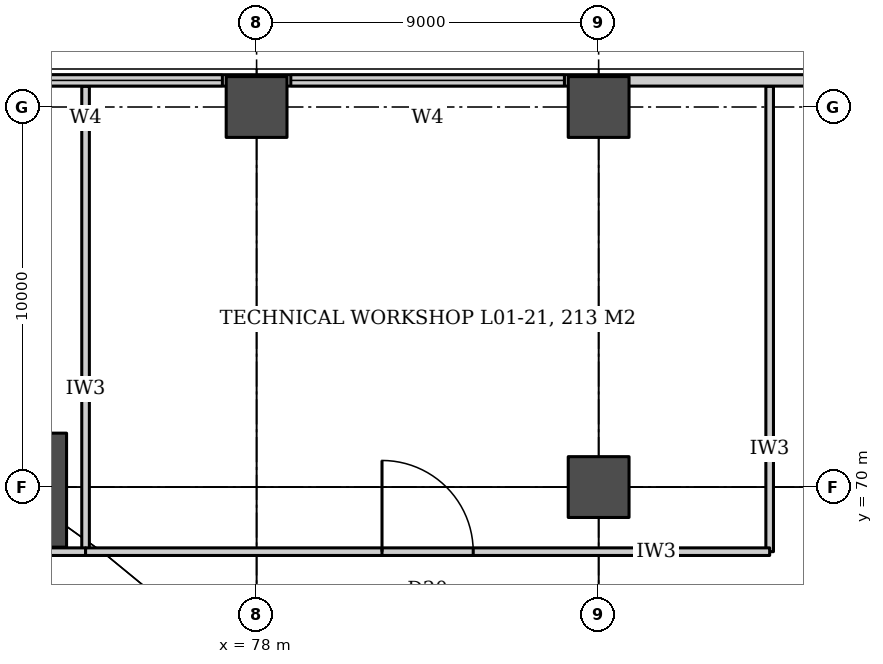
"""IFC4 building model, lengths in metres.
Left out: names, types, materials, properties, quantities, classifications, styles, units other than length and angle.
Written with IfcOpenShell. Run it as: python <this file> out.ifc"""

import sys

from ifc_helpers import new_model, si_unit, direction, frame, frame_2d, origin, origin_2d, place, context, subcontext, project, spatial, rectangle, circle, extrude, element, fill, save


model = new_model("IFC4")
c1 = context("Model", 3, precision=1e-05, world=origin(), true_north=direction((0.0, 1.0)))
c2 = subcontext(c1, "Body", "Model", "MODEL_VIEW")
j1 = project(units=[si_unit("LENGTHUNIT", "METRE"), si_unit("PLANEANGLEUNIT", "RADIAN")], contexts=[c1])
p1 = place(None, origin())
s1 = spatial("IfcSite", under=j1, at=p1, CompositionType="ELEMENT")
p2 = place(p1, origin())
s2 = spatial("IfcBuilding", under=s1, at=p2, CompositionType="ELEMENT")
p3 = place(p2, frame((0.0, 0.0, 6.0)))
s3 = spatial("IfcBuildingStorey", under=s2, at=p3, CompositionType="ELEMENT", Elevation=6.0)
for number, where, z_axis, x_axis in (
    (1, (87.0, 70.0, 0.0), (0.0, 0.0, 1.0), (1.0, 0.0, 0.0)),
    (2, (78.0, 80.0, 0.0), (0.0, 0.0, 1.0), (1.0, 0.0, 0.0)),
    (3, (87.0, 80.0, 0.0), (0.0, 0.0, 1.0), (1.0, 0.0, 0.0)),
):
    element("IfcColumn", number, at=place(p3, frame(where, z_axis=z_axis, x_axis=x_axis)), inside=s3, PredefinedType="COLUMN", context=c2, shape_type="SweptSolid", body=[
        extrude(rectangle(XDim=1.6, YDim=1.6, at=origin_2d()), origin(), (0.0, 0.0, 1.0), 9.0),
    ])
p4 = place(p3, frame((71.5, 69.919, 0.0), z_axis=(0.0, 0.0, 1.0), x_axis=(1.0, 0.0, 0.0)))
e4 = element("IfcColumn", 4, at=p4, inside=s3, PredefinedType="COLUMN", context=c2, shape_type="SweptSolid", body=[
    extrude(circle(Radius=1.5, at=origin_2d()), origin(), (0.0, 0.0, 1.0), 9.0),
])
for number, where, z_axis, x_axis in (
    (5, (73.5, 68.3, 0.0), (0.0, 0.0, 1.0), (0.0, 1.0, 0.0)),
    (6, (91.5, 68.3, 0.0), (0.0, 0.0, 1.0), (0.0, 1.0, 0.0)),
):
    element("IfcWall", number, at=place(p3, frame(where, z_axis=z_axis, x_axis=x_axis)), inside=s3, PredefinedType="PARTITIONING", context=c2, shape_type="SweptSolid", body=[
        extrude(rectangle(XDim=12.245, YDim=0.2, at=frame_2d((6.123, 0.0))), origin(), (0.0, 0.0, 1.0), 6.68),
    ])
p5 = place(p3, frame((46.5, 68.3, 0.0), z_axis=(0.0, 0.0, 1.0), x_axis=(1.0, 0.0, 0.0)))
e7 = element("IfcWall", 7, at=p5, inside=s3, PredefinedType="PARTITIONING", context=c2, shape_type="SweptSolid", body=[
    extrude(rectangle(XDim=27.0, YDim=0.2, at=frame_2d((13.5, 0.0))), origin(), (0.0, 0.0, 1.0), 6.08),
])
p6 = place(p5, frame((13.0, 0.0, 0.0)))
e8 = element("IfcOpeningElement", 8, at=p6, cuts=e7, PredefinedType="OPENING", context=c2, shape_type="SweptSolid", body=[
    extrude(rectangle(XDim=1.0, YDim=2.1, at=frame_2d((0.5, 1.05))), frame((0.0, 0.11, 0.0), z_axis=(0.0, -1.0, 0.0), x_axis=(1.0, 0.0, 0.0)), (0.0, 0.0, 1.0), 0.22),
])
p7 = place(p3, frame((73.5, 68.3, 0.0), z_axis=(0.0, 0.0, 1.0), x_axis=(1.0, 0.0, 0.0)))
e9 = element("IfcWall", 9, at=p7, inside=s3, PredefinedType="PARTITIONING", context=c2, shape_type="SweptSolid", body=[
    extrude(rectangle(XDim=18.0, YDim=0.2, at=frame_2d((9.0, 0.0))), origin(), (0.0, 0.0, 1.0), 6.68),
])
p8 = place(p7, frame((7.8, 0.0, 0.0)))
e10 = element("IfcOpeningElement", 10, at=p8, cuts=e9, PredefinedType="OPENING", context=c2, shape_type="SweptSolid", body=[
    extrude(rectangle(XDim=2.4, YDim=2.7, at=frame_2d((1.2, 1.35))), frame((0.0, 0.11, 0.0), z_axis=(0.0, -1.0, 0.0), x_axis=(1.0, 0.0, 0.0)), (0.0, 0.0, 1.0), 0.22),
])
p9 = place(p3, frame((95.0, 80.7, 0.0), z_axis=(0.0, 0.0, 1.0), x_axis=(-1.0, 0.0, 0.0)))
e11 = element("IfcWall", 11, at=p9, inside=s3, PredefinedType="SOLIDWALL", context=c2, shape_type="SweptSolid", body=[
    extrude(rectangle(XDim=70.0, YDim=0.3, at=frame_2d((35.0, 0.0))), origin(), (0.0, 0.0, 1.0), 8.7),
])
p10 = place(p9, frame((53.9, 0.0, 6.6)))
e12 = element("IfcOpeningElement", 12, at=p10, cuts=e11, PredefinedType="OPENING", context=c2, shape_type="SweptSolid", body=[
    extrude(rectangle(XDim=7.2, YDim=1.2, at=frame_2d((3.6, 0.6))), frame((0.0, 0.16, 0.0), z_axis=(0.0, -1.0, 0.0), x_axis=(1.0, 0.0, 0.0)), (0.0, 0.0, 1.0), 0.32),
])
p11 = place(p9, frame((44.9, 0.0, 6.6)))
e13 = element("IfcOpeningElement", 13, at=p11, cuts=e11, PredefinedType="OPENING", context=c2, shape_type="SweptSolid", body=[
    extrude(rectangle(XDim=7.2, YDim=1.2, at=frame_2d((3.6, 0.6))), frame((0.0, 0.16, 0.0), z_axis=(0.0, -1.0, 0.0), x_axis=(1.0, 0.0, 0.0)), (0.0, 0.0, 1.0), 0.32),
])
p12 = place(p9, frame((35.9, 0.0, 6.6)))
e14 = element("IfcOpeningElement", 14, at=p12, cuts=e11, PredefinedType="OPENING", context=c2, shape_type="SweptSolid", body=[
    extrude(rectangle(XDim=7.2, YDim=1.2, at=frame_2d((3.6, 0.6))), frame((0.0, 0.16, 0.0), z_axis=(0.0, -1.0, 0.0), x_axis=(1.0, 0.0, 0.0)), (0.0, 0.0, 1.0), 0.32),
])
p13 = place(p9, frame((26.9, 0.0, 6.6)))
e15 = element("IfcOpeningElement", 15, at=p13, cuts=e11, PredefinedType="OPENING", context=c2, shape_type="SweptSolid", body=[
    extrude(rectangle(XDim=7.2, YDim=1.2, at=frame_2d((3.6, 0.6))), frame((0.0, 0.16, 0.0), z_axis=(0.0, -1.0, 0.0), x_axis=(1.0, 0.0, 0.0)), (0.0, 0.0, 1.0), 0.32),
])
p14 = place(p9, frame((17.9, 0.0, 6.6)))
e16 = element("IfcOpeningElement", 16, at=p14, cuts=e11, PredefinedType="OPENING", context=c2, shape_type="SweptSolid", body=[
    extrude(rectangle(XDim=7.2, YDim=1.2, at=frame_2d((3.6, 0.6))), frame((0.0, 0.16, 0.0), z_axis=(0.0, -1.0, 0.0), x_axis=(1.0, 0.0, 0.0)), (0.0, 0.0, 1.0), 0.32),
])
p15 = place(p9, frame((8.9, 0.0, 6.6)))
e17 = element("IfcOpeningElement", 17, at=p15, cuts=e11, PredefinedType="OPENING", context=c2, shape_type="SweptSolid", body=[
    extrude(rectangle(XDim=7.2, YDim=1.2, at=frame_2d((3.6, 0.6))), frame((0.0, 0.16, 0.0), z_axis=(0.0, -1.0, 0.0), x_axis=(1.0, 0.0, 0.0)), (0.0, 0.0, 1.0), 0.32),
])
p16 = place(p8, origin())
e18 = element("IfcDoor", 18, at=p16, inside=s3, OperationType="DOUBLE_DOOR_DOUBLE_SWING", PredefinedType="DOOR", context=c2, shape_type="SweptSolid", body=[
    extrude(rectangle(XDim=2.4, YDim=2.7, at=frame_2d((1.2, 1.35))), frame((0.0, 0.025, 0.0), z_axis=(0.0, -1.0, 0.0), x_axis=(1.0, 0.0, 0.0)), (0.0, 0.0, 1.0), 0.05),
])
fill(e10, e18)
p17 = place(p14, origin())
e19 = element("IfcWindow", 19, at=p17, inside=s3, PartitioningType="SINGLE_PANEL", PredefinedType="WINDOW", context=c2, shape_type="SweptSolid", body=[
    extrude(rectangle(XDim=7.2, YDim=1.2, at=frame_2d((3.6, 0.6))), frame((0.0, 0.03, 0.0), z_axis=(0.0, -1.0, 0.0), x_axis=(1.0, 0.0, 0.0)), (0.0, 0.0, 1.0), 0.06),
])
fill(e16, e19)
p18 = place(p15, origin())
e20 = element("IfcWindow", 20, at=p18, inside=s3, PartitioningType="SINGLE_PANEL", PredefinedType="WINDOW", context=c2, shape_type="SweptSolid", body=[
    extrude(rectangle(XDim=7.2, YDim=1.2, at=frame_2d((3.6, 0.6))), frame((0.0, 0.03, 0.0), z_axis=(0.0, -1.0, 0.0), x_axis=(1.0, 0.0, 0.0)), (0.0, 0.0, 1.0), 0.06),
])
fill(e17, e20)
save(model, sys.argv[1])
